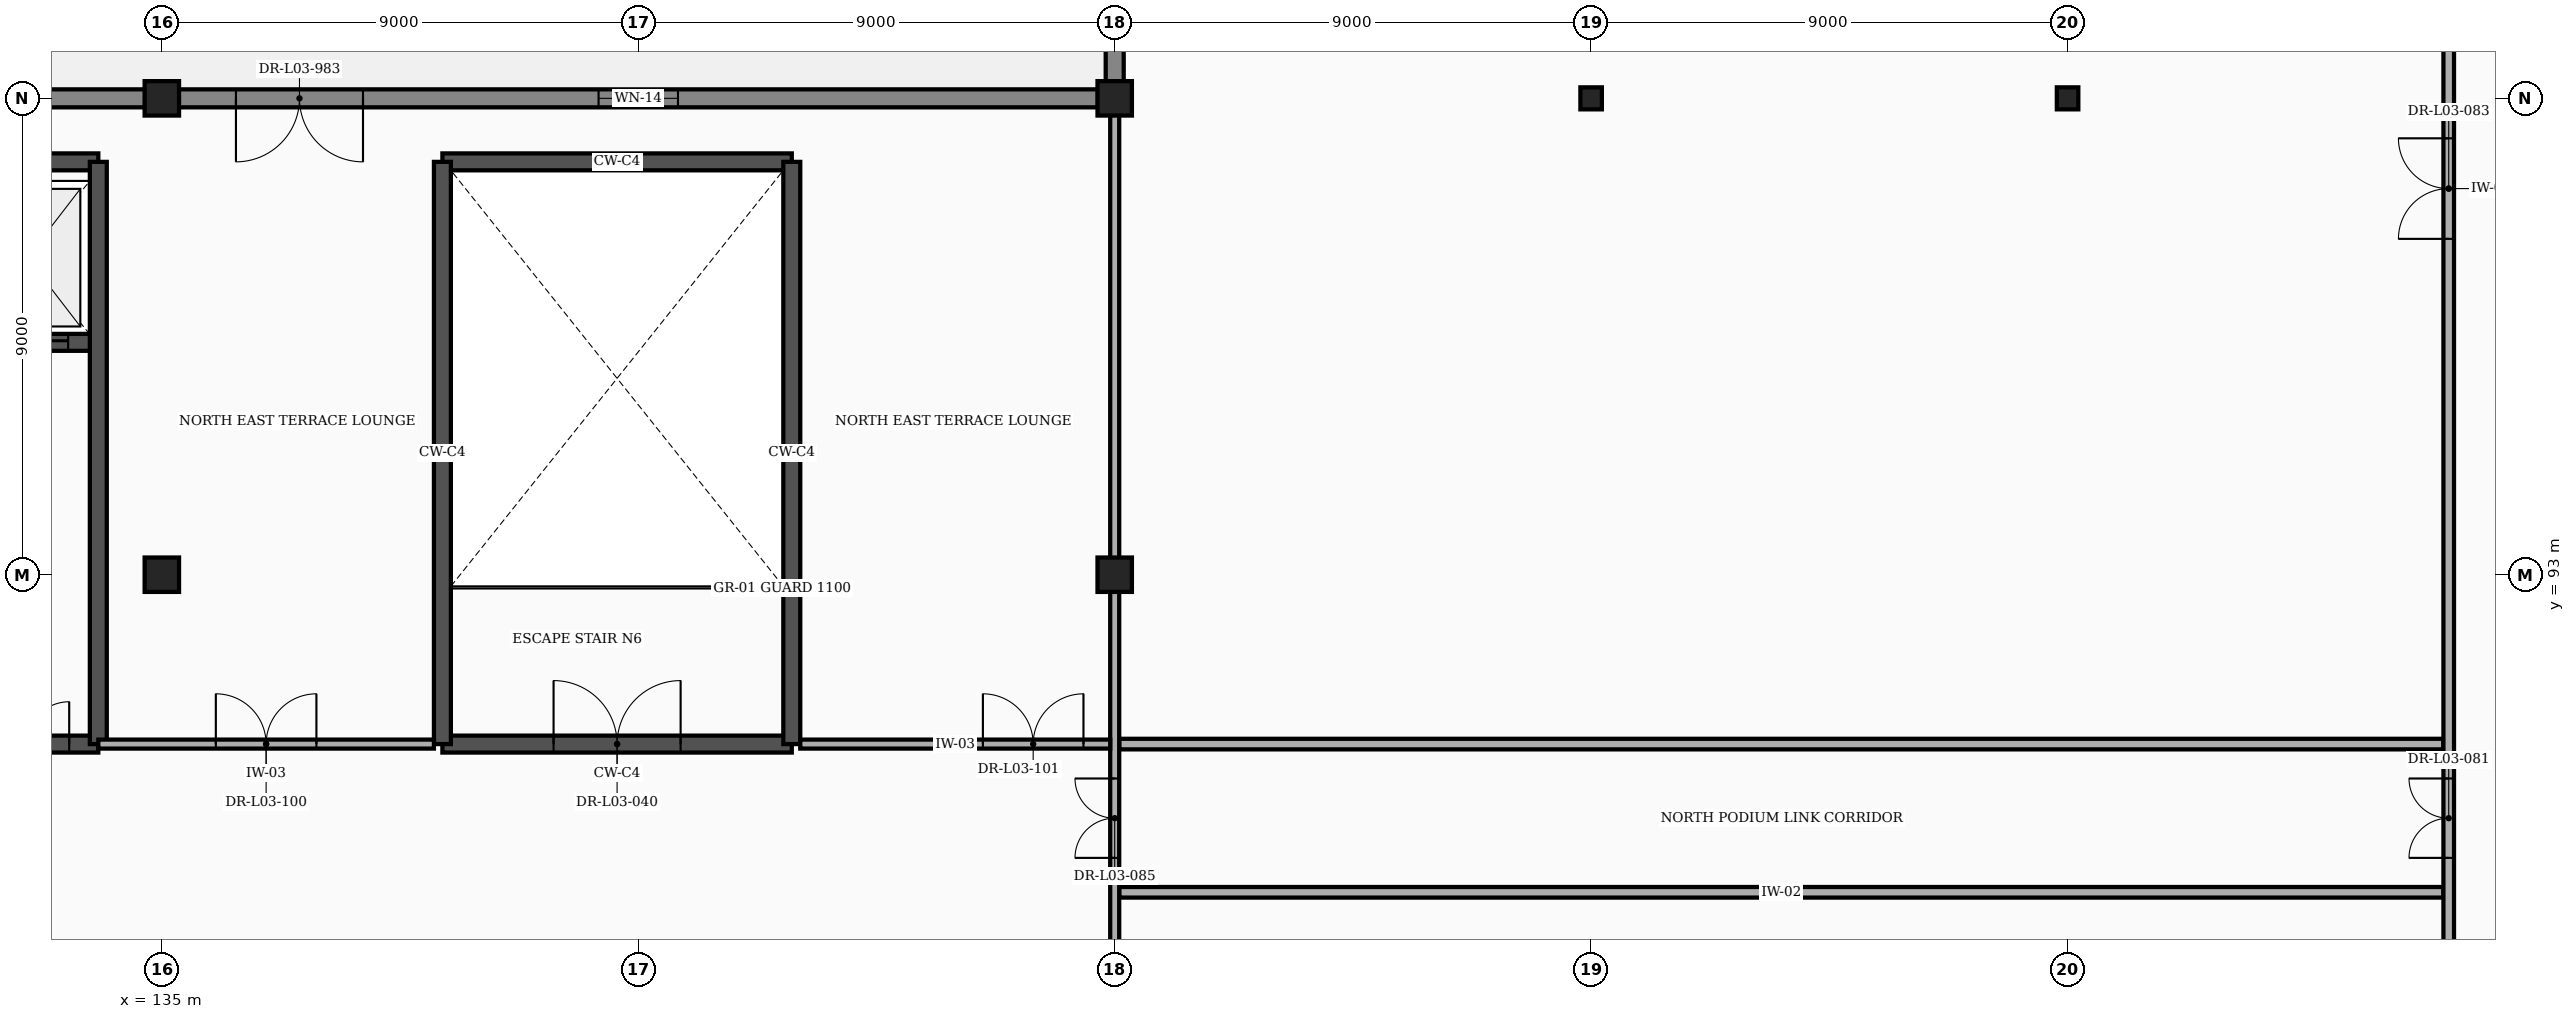
"""IFC4 building model, lengths in metres.
Left out: names, types, materials, properties, quantities, classifications, styles, units other than length and angle.
Written with IfcOpenShell. Run it as: python <this file> out.ifc"""

import sys

from ifc_helpers import new_model, si_unit, direction, frame, frame_2d, origin, origin_2d, place, context, subcontext, project, spatial, rectangle, i_section, extrude, element, fill, save


model = new_model("IFC4")
c1 = context("Model", 3, precision=1e-05, world=origin(), true_north=direction((0.0, 1.0)))
c2 = subcontext(c1, "Body", "Model", "MODEL_VIEW")
j1 = project(units=[si_unit("LENGTHUNIT", "METRE"), si_unit("PLANEANGLEUNIT", "RADIAN")], contexts=[c1])
p1 = place(None, origin())
s1 = spatial("IfcSite", under=j1, at=p1, CompositionType="ELEMENT")
p2 = place(p1, origin())
s2 = spatial("IfcBuilding", under=s1, at=p2, CompositionType="ELEMENT")
p3 = place(p2, frame((0.0, 0.0, 16.8)))
s3 = spatial("IfcBuildingStorey", under=s2, at=p3, CompositionType="ELEMENT", Elevation=16.8)
for number, where, z_axis, x_axis in (
    (1, (135.0, 93.0, 0.0), (0.0, 0.0, 1.0), (1.0, 0.0, 0.0)),
    (2, (135.0, 102.0, 0.0), (0.0, 0.0, 1.0), (1.0, 0.0, 0.0)),
    (3, (153.0, 93.0, 0.0), (0.0, 0.0, 1.0), (1.0, 0.0, 0.0)),
    (4, (153.0, 102.0, 0.0), (0.0, 0.0, 1.0), (1.0, 0.0, 0.0)),
):
    element("IfcColumn", number, at=place(p3, frame(where, z_axis=z_axis, x_axis=x_axis)), inside=s3, PredefinedType="COLUMN", context=c2, shape_type="SweptSolid", body=[
        extrude(rectangle(XDim=0.65, YDim=0.65, at=origin_2d()), origin(), (0.0, 0.0, 1.0), 4.8),
    ])
for number, where, z_axis, x_axis in (
    (5, (162.0, 102.0, 0.0), (0.0, 0.0, 1.0), (1.0, 0.0, 0.0)),
    (6, (171.0, 102.0, 0.0), (0.0, 0.0, 1.0), (1.0, 0.0, 0.0)),
):
    element("IfcColumn", number, at=place(p3, frame(where, z_axis=z_axis, x_axis=x_axis)), inside=s3, PredefinedType="COLUMN", context=c2, shape_type="SweptSolid", body=[
        extrude(i_section(OverallWidth=0.406, OverallDepth=0.416, WebThickness=0.03, FlangeThickness=0.048, at=origin_2d()), origin(), (0.0, 0.0, 1.0), 4.8),
    ])
p4 = place(p3, frame((117.317, 102.0, 0.0), z_axis=(0.0, 0.0, 1.0), x_axis=(1.0, 0.0, 0.0)))
e7 = element("IfcWall", 7, at=p4, inside=s3, PredefinedType="STANDARD", context=c2, shape_type="SweptSolid", body=[
    extrude(rectangle(XDim=17.366, YDim=0.34, at=frame_2d((8.683, 0.0))), origin(), (0.0, 0.0, 1.0), 4.195),
])
p5 = place(p4, frame((7.933, 0.0, 0.85)))
e8 = element("IfcOpeningElement", 8, at=p5, cuts=e7, PredefinedType="OPENING", context=c2, shape_type="SweptSolid", body=[
    extrude(rectangle(XDim=1.5, YDim=1.8, at=frame_2d((0.75, 0.9))), frame((0.0, 0.182, 0.0), z_axis=(0.0, -1.0, 0.0), x_axis=(1.0, 0.0, 0.0)), (0.0, 0.0, 1.0), 0.364),
])
p6 = place(p3, frame((135.317, 102.0, 0.0), z_axis=(0.0, 0.0, 1.0), x_axis=(1.0, 0.0, 0.0)))
e9 = element("IfcWall", 9, at=p6, inside=s3, PredefinedType="STANDARD", context=c2, shape_type="SweptSolid", body=[
    extrude(rectangle(XDim=17.366, YDim=0.34, at=frame_2d((8.683, 0.0))), origin(), (0.0, 0.0, 1.0), 4.195),
])
p7 = place(p6, frame((7.933, 0.0, 0.85)))
e10 = element("IfcOpeningElement", 10, at=p7, cuts=e9, PredefinedType="OPENING", context=c2, shape_type="SweptSolid", body=[
    extrude(rectangle(XDim=1.5, YDim=1.8, at=frame_2d((0.75, 0.9))), frame((0.0, 0.182, 0.0), z_axis=(0.0, -1.0, 0.0), x_axis=(1.0, 0.0, 0.0)), (0.0, 0.0, 1.0), 0.364),
])
p8 = place(p6, frame((1.083, 0.0, 0.0)))
e11 = element("IfcOpeningElement", 11, at=p8, cuts=e9, PredefinedType="OPENING", context=c2, shape_type="SweptSolid", body=[
    extrude(rectangle(XDim=2.4, YDim=2.35, at=frame_2d((1.2, 1.175))), frame((0.0, 0.182, 0.0), z_axis=(0.0, -1.0, 0.0), x_axis=(1.0, 0.0, 0.0)), (0.0, 0.0, 1.0), 0.364),
])
p9 = place(p3, frame((153.0, 102.317, 0.0), z_axis=(0.0, 0.0, 1.0), x_axis=(0.0, 1.0, 0.0)))
e12 = element("IfcWall", 12, at=p9, inside=s3, PredefinedType="STANDARD", context=c2, shape_type="SweptSolid", body=[
    extrude(rectangle(XDim=8.366, YDim=0.34, at=frame_2d((4.183, 0.0))), origin(), (0.0, 0.0, 1.0), 4.555),
])
p10 = place(p9, frame((2.583, 0.0, 0.85)))
e13 = element("IfcOpeningElement", 13, at=p10, cuts=e12, PredefinedType="OPENING", context=c2, shape_type="SweptSolid", body=[
    extrude(rectangle(XDim=3.2, YDim=2.2, at=frame_2d((1.6, 1.1))), frame((0.0, 0.182, 0.0), z_axis=(0.0, -1.0, 0.0), x_axis=(1.0, 0.0, 0.0)), (0.0, 0.0, 1.0), 0.364),
])
p11 = place(p3, frame((127.2, 89.8, 0.0), z_axis=(0.0, 0.0, 1.0), x_axis=(1.0, 0.0, 0.0)))
e14 = element("IfcWall", 14, at=p11, inside=s3, PredefinedType="SHEAR", context=c2, shape_type="SweptSolid", body=[
    extrude(rectangle(XDim=6.6, YDim=0.32, at=frame_2d((3.3, 0.0))), origin(), (0.0, 0.0, 1.0), 4.555),
])
p12 = place(p11, frame((4.45, 0.0, 0.0)))
e15 = element("IfcOpeningElement", 15, at=p12, cuts=e14, PredefinedType="OPENING", context=c2, shape_type="SweptSolid", body=[
    extrude(rectangle(XDim=1.6, YDim=2.3, at=frame_2d((0.8, 1.15))), frame((0.0, 0.172, 0.0), z_axis=(0.0, -1.0, 0.0), x_axis=(1.0, 0.0, 0.0)), (0.0, 0.0, 1.0), 0.344),
])
p13 = place(p3, frame((127.2, 100.8, 0.0), z_axis=(0.0, 0.0, 1.0), x_axis=(1.0, 0.0, 0.0)))
e16 = element("IfcWall", 16, at=p13, inside=s3, PredefinedType="SHEAR", context=c2, shape_type="SweptSolid", body=[
    extrude(rectangle(XDim=6.6, YDim=0.32, at=frame_2d((3.3, 0.0))), origin(), (0.0, 0.0, 1.0), 4.555),
])
p14 = place(p3, frame((133.8, 89.8, 0.0), z_axis=(0.0, 0.0, 1.0), x_axis=(0.0, 1.0, 0.0)))
e17 = element("IfcWall", 17, at=p14, inside=s3, PredefinedType="SHEAR", context=c2, shape_type="SweptSolid", body=[
    extrude(rectangle(XDim=11.0, YDim=0.32, at=frame_2d((5.5, 0.0))), origin(), (0.0, 0.0, 1.0), 4.555),
])
p15 = place(p3, frame((131.28, 97.39, 0.0), z_axis=(0.0, 0.0, 1.0), x_axis=(1.0, 0.0, 0.0)))
e18 = element("IfcWall", 18, at=p15, inside=s3, PredefinedType="SHEAR", context=c2, shape_type="SweptSolid", body=[
    extrude(rectangle(XDim=2.36, YDim=0.32, at=frame_2d((1.18, 0.0))), origin(), (0.0, 0.0, 1.0), 4.555),
])
p16 = place(p15, frame((0.3, 0.0, 0.0)))
e19 = element("IfcOpeningElement", 19, at=p16, cuts=e18, PredefinedType="OPENING", context=c2, shape_type="SweptSolid", body=[
    extrude(rectangle(XDim=1.65, YDim=2.35, at=frame_2d((0.825, 1.175))), frame((0.0, 0.172, 0.0), z_axis=(0.0, -1.0, 0.0), x_axis=(1.0, 0.0, 0.0)), (0.0, 0.0, 1.0), 0.344),
])
p17 = place(p3, frame((140.3, 89.8, 0.0), z_axis=(0.0, 0.0, 1.0), x_axis=(1.0, 0.0, 0.0)))
e20 = element("IfcWall", 20, at=p17, inside=s3, PredefinedType="SHEAR", context=c2, shape_type="SweptSolid", body=[
    extrude(rectangle(XDim=6.6, YDim=0.32, at=frame_2d((3.3, 0.0))), origin(), (0.0, 0.0, 1.0), 4.555),
])
p18 = place(p17, frame((2.1, 0.0, 0.0)))
e21 = element("IfcOpeningElement", 21, at=p18, cuts=e20, PredefinedType="OPENING", context=c2, shape_type="SweptSolid", body=[
    extrude(rectangle(XDim=2.4, YDim=2.25, at=frame_2d((1.2, 1.125))), frame((0.0, 0.172, 0.0), z_axis=(0.0, -1.0, 0.0), x_axis=(1.0, 0.0, 0.0)), (0.0, 0.0, 1.0), 0.344),
])
p19 = place(p3, frame((140.3, 100.8, 0.0), z_axis=(0.0, 0.0, 1.0), x_axis=(1.0, 0.0, 0.0)))
e22 = element("IfcWall", 22, at=p19, inside=s3, PredefinedType="SHEAR", context=c2, shape_type="SweptSolid", body=[
    extrude(rectangle(XDim=6.6, YDim=0.32, at=frame_2d((3.3, 0.0))), origin(), (0.0, 0.0, 1.0), 4.555),
])
for number, where, z_axis, x_axis in (
    (23, (140.3, 89.8, 0.0), (0.0, 0.0, 1.0), (0.0, 1.0, 0.0)),
    (24, (146.9, 89.8, 0.0), (0.0, 0.0, 1.0), (0.0, 1.0, 0.0)),
):
    element("IfcWall", number, at=place(p3, frame(where, z_axis=z_axis, x_axis=x_axis)), inside=s3, PredefinedType="SHEAR", context=c2, shape_type="SweptSolid", body=[
        extrude(rectangle(XDim=11.0, YDim=0.32, at=frame_2d((5.5, 0.0))), origin(), (0.0, 0.0, 1.0), 4.555),
    ])
for number, where, z_axis, x_axis in (
    (25, (153.085, 87.0, 0.0), (0.0, 0.0, 1.0), (1.0, 0.0, 0.0)),
    (26, (153.085, 89.8, 0.0), (0.0, 0.0, 1.0), (1.0, 0.0, 0.0)),
):
    element("IfcWall", number, at=place(p3, frame(where, z_axis=z_axis, x_axis=x_axis)), inside=s3, PredefinedType="PARTITIONING", context=c2, shape_type="SweptSolid", body=[
        extrude(rectangle(XDim=25.015, YDim=0.2, at=frame_2d((12.508, 0.0))), origin(), (0.0, 0.0, 1.0), 4.555),
    ])
p20 = place(p3, frame((178.2, 80.76, 0.0), z_axis=(0.0, 0.0, 1.0), x_axis=(0.0, 1.0, 0.0)))
e27 = element("IfcWall", 27, at=p20, inside=s3, PredefinedType="PARTITIONING", context=c2, shape_type="SweptSolid", body=[
    extrude(rectangle(XDim=39.07, YDim=0.2, at=frame_2d((19.535, 0.0))), origin(), (0.0, 0.0, 1.0), 4.555),
])
p21 = place(p20, frame((1.1, 0.0, 0.0)))
e28 = element("IfcOpeningElement", 28, at=p21, cuts=e27, PredefinedType="OPENING", context=c2, shape_type="SweptSolid", body=[
    extrude(rectangle(XDim=1.15, YDim=2.15, at=frame_2d((0.575, 1.075))), frame((0.0, 0.112, 0.0), z_axis=(0.0, -1.0, 0.0), x_axis=(1.0, 0.0, 0.0)), (0.0, 0.0, 1.0), 0.224),
])
p22 = place(p20, frame((6.89, 0.0, 0.0)))
e29 = element("IfcOpeningElement", 29, at=p22, cuts=e27, PredefinedType="OPENING", context=c2, shape_type="SweptSolid", body=[
    extrude(rectangle(XDim=1.5, YDim=2.2, at=frame_2d((0.75, 1.1))), frame((0.0, 0.112, 0.0), z_axis=(0.0, -1.0, 0.0), x_axis=(1.0, 0.0, 0.0)), (0.0, 0.0, 1.0), 0.224),
])
p23 = place(p20, frame((23.19, 0.0, 0.0)))
e30 = element("IfcOpeningElement", 30, at=p23, cuts=e27, PredefinedType="OPENING", context=c2, shape_type="SweptSolid", body=[
    extrude(rectangle(XDim=1.9, YDim=2.35, at=frame_2d((0.95, 1.175))), frame((0.0, 0.112, 0.0), z_axis=(0.0, -1.0, 0.0), x_axis=(1.0, 0.0, 0.0)), (0.0, 0.0, 1.0), 0.224),
])
p24 = place(p20, frame((18.585, 0.0, 0.0)))
e31 = element("IfcOpeningElement", 31, at=p24, cuts=e27, PredefinedType="OPENING", context=c2, shape_type="SweptSolid", body=[
    extrude(rectangle(XDim=1.9, YDim=2.35, at=frame_2d((0.95, 1.175))), frame((0.0, 0.112, 0.0), z_axis=(0.0, -1.0, 0.0), x_axis=(1.0, 0.0, 0.0)), (0.0, 0.0, 1.0), 0.224),
])
p25 = place(p3, frame((153.0, 84.22, 0.0), z_axis=(0.0, 0.0, 1.0), x_axis=(0.0, 1.0, 0.0)))
e32 = element("IfcWall", 32, at=p25, inside=s3, PredefinedType="PARTITIONING", context=c2, shape_type="SweptSolid", body=[
    extrude(rectangle(XDim=8.56, YDim=0.17, at=frame_2d((4.28, 0.0))), origin(), (0.0, 0.0, 1.0), 4.258),
])
p26 = place(p25, frame((3.43, 0.0, 0.0)))
e33 = element("IfcOpeningElement", 33, at=p26, cuts=e32, PredefinedType="OPENING", context=c2, shape_type="SweptSolid", body=[
    extrude(rectangle(XDim=1.5, YDim=2.2, at=frame_2d((0.75, 1.1))), frame((0.0, 0.097, 0.0), z_axis=(0.0, -1.0, 0.0), x_axis=(1.0, 0.0, 0.0)), (0.0, 0.0, 1.0), 0.194),
])
p27 = place(p3, frame((153.0, 93.22, 0.0), z_axis=(0.0, 0.0, 1.0), x_axis=(0.0, 1.0, 0.0)))
e34 = element("IfcWall", 34, at=p27, inside=s3, PredefinedType="PARTITIONING", context=c2, shape_type="SweptSolid", body=[
    extrude(rectangle(XDim=8.56, YDim=0.17, at=frame_2d((4.28, 0.0))), origin(), (0.0, 0.0, 1.0), 4.002),
])
p28 = place(p3, frame((133.8, 89.8, 0.0), z_axis=(0.0, 0.0, 1.0), x_axis=(1.0, 0.0, 0.0)))
e35 = element("IfcWall", 35, at=p28, inside=s3, PredefinedType="PARTITIONING", context=c2, shape_type="SweptSolid", body=[
    extrude(rectangle(XDim=6.34, YDim=0.17, at=frame_2d((3.17, 0.0))), origin(), (0.0, 0.0, 1.0), 4.555),
])
p29 = place(p28, frame((2.22, 0.0, 0.0)))
e36 = element("IfcOpeningElement", 36, at=p29, cuts=e35, PredefinedType="OPENING", context=c2, shape_type="SweptSolid", body=[
    extrude(rectangle(XDim=1.9, YDim=2.35, at=frame_2d((0.95, 1.175))), frame((0.0, 0.097, 0.0), z_axis=(0.0, -1.0, 0.0), x_axis=(1.0, 0.0, 0.0)), (0.0, 0.0, 1.0), 0.194),
])
p30 = place(p3, frame((147.06, 89.8, 0.0), z_axis=(0.0, 0.0, 1.0), x_axis=(1.0, 0.0, 0.0)))
e37 = element("IfcWall", 37, at=p30, inside=s3, PredefinedType="PARTITIONING", context=c2, shape_type="SweptSolid", body=[
    extrude(rectangle(XDim=5.855, YDim=0.17, at=frame_2d((2.927, 0.0))), origin(), (0.0, 0.0, 1.0), 4.555),
])
p31 = place(p30, frame((3.45, 0.0, 0.0)))
e38 = element("IfcOpeningElement", 38, at=p31, cuts=e37, PredefinedType="OPENING", context=c2, shape_type="SweptSolid", body=[
    extrude(rectangle(XDim=1.9, YDim=2.35, at=frame_2d((0.95, 1.175))), frame((0.0, 0.097, 0.0), z_axis=(0.0, -1.0, 0.0), x_axis=(1.0, 0.0, 0.0)), (0.0, 0.0, 1.0), 0.194),
])
p32 = place(p7, origin())
e39 = element("IfcWindow", 39, at=p32, inside=s3, PartitioningType="SINGLE_PANEL", PredefinedType="WINDOW", context=c2, shape_type="SweptSolid", body=[
    extrude(rectangle(XDim=1.5, YDim=1.8, at=frame_2d((0.75, 0.9))), frame((0.0, 0.03, 0.0), z_axis=(0.0, -1.0, 0.0), x_axis=(1.0, 0.0, 0.0)), (0.0, 0.0, 1.0), 0.06),
])
fill(e10, e39)
p33 = place(p8, frame((2.4, 0.0, 0.0), z_axis=(0.0, 0.0, 1.0), x_axis=(-1.0, 0.0, 0.0)))
e40 = element("IfcDoor", 40, at=p33, inside=s3, OperationType="DOUBLE_DOOR_SINGLE_SWING", PredefinedType="DOOR", context=c2, shape_type="SweptSolid", body=[
    extrude(rectangle(XDim=2.4, YDim=2.35, at=frame_2d((1.2, 1.175))), frame((0.0, 0.025, 0.0), z_axis=(0.0, -1.0, 0.0), x_axis=(1.0, 0.0, 0.0)), (0.0, 0.0, 1.0), 0.05),
])
fill(e11, e40)
p34 = place(p16, origin())
e41 = element("IfcDoor", 41, at=p34, inside=s3, OperationType="DOUBLE_DOOR_SLIDING", PredefinedType="DOOR", context=c2, shape_type="SweptSolid", body=[
    extrude(rectangle(XDim=1.65, YDim=2.35, at=frame_2d((0.825, 1.175))), frame((0.0, 0.025, 0.0), z_axis=(0.0, -1.0, 0.0), x_axis=(1.0, 0.0, 0.0)), (0.0, 0.0, 1.0), 0.05),
])
fill(e19, e41)
p35 = place(p12, origin())
e42 = element("IfcDoor", 42, at=p35, inside=s3, OperationType="DOUBLE_DOOR_SINGLE_SWING", PredefinedType="DOOR", context=c2, shape_type="SweptSolid", body=[
    extrude(rectangle(XDim=1.6, YDim=2.3, at=frame_2d((0.8, 1.15))), frame((0.0, 0.025, 0.0), z_axis=(0.0, -1.0, 0.0), x_axis=(1.0, 0.0, 0.0)), (0.0, 0.0, 1.0), 0.05),
])
fill(e15, e42)
p36 = place(p18, origin())
e43 = element("IfcDoor", 43, at=p36, inside=s3, OperationType="DOUBLE_DOOR_SINGLE_SWING", PredefinedType="DOOR", context=c2, shape_type="SweptSolid", body=[
    extrude(rectangle(XDim=2.4, YDim=2.25, at=frame_2d((1.2, 1.125))), frame((0.0, 0.025, 0.0), z_axis=(0.0, -1.0, 0.0), x_axis=(1.0, 0.0, 0.0)), (0.0, 0.0, 1.0), 0.05),
])
fill(e21, e43)
p37 = place(p22, origin())
e44 = element("IfcDoor", 44, at=p37, inside=s3, OperationType="DOUBLE_DOOR_SINGLE_SWING", PredefinedType="DOOR", context=c2, shape_type="SweptSolid", body=[
    extrude(rectangle(XDim=1.5, YDim=2.2, at=frame_2d((0.75, 1.1))), frame((0.0, 0.025, 0.0), z_axis=(0.0, -1.0, 0.0), x_axis=(1.0, 0.0, 0.0)), (0.0, 0.0, 1.0), 0.05),
])
fill(e29, e44)
p38 = place(p24, origin())
e45 = element("IfcDoor", 45, at=p38, inside=s3, OperationType="DOUBLE_DOOR_SINGLE_SWING", PredefinedType="DOOR", context=c2, shape_type="SweptSolid", body=[
    extrude(rectangle(XDim=1.9, YDim=2.35, at=frame_2d((0.95, 1.175))), frame((0.0, 0.025, 0.0), z_axis=(0.0, -1.0, 0.0), x_axis=(1.0, 0.0, 0.0)), (0.0, 0.0, 1.0), 0.05),
])
fill(e31, e45)
p39 = place(p26, origin())
e46 = element("IfcDoor", 46, at=p39, inside=s3, OperationType="DOUBLE_DOOR_SINGLE_SWING", PredefinedType="DOOR", context=c2, shape_type="SweptSolid", body=[
    extrude(rectangle(XDim=1.5, YDim=2.2, at=frame_2d((0.75, 1.1))), frame((0.0, 0.025, 0.0), z_axis=(0.0, -1.0, 0.0), x_axis=(1.0, 0.0, 0.0)), (0.0, 0.0, 1.0), 0.05),
])
fill(e33, e46)
p40 = place(p29, origin())
e47 = element("IfcDoor", 47, at=p40, inside=s3, OperationType="DOUBLE_DOOR_SINGLE_SWING", PredefinedType="DOOR", context=c2, shape_type="SweptSolid", body=[
    extrude(rectangle(XDim=1.9, YDim=2.35, at=frame_2d((0.95, 1.175))), frame((0.0, 0.025, 0.0), z_axis=(0.0, -1.0, 0.0), x_axis=(1.0, 0.0, 0.0)), (0.0, 0.0, 1.0), 0.05),
])
fill(e36, e47)
p41 = place(p31, origin())
e48 = element("IfcDoor", 48, at=p41, inside=s3, OperationType="DOUBLE_DOOR_SINGLE_SWING", PredefinedType="DOOR", context=c2, shape_type="SweptSolid", body=[
    extrude(rectangle(XDim=1.9, YDim=2.35, at=frame_2d((0.95, 1.175))), frame((0.0, 0.025, 0.0), z_axis=(0.0, -1.0, 0.0), x_axis=(1.0, 0.0, 0.0)), (0.0, 0.0, 1.0), 0.05),
])
fill(e38, e48)
save(model, sys.argv[1])
